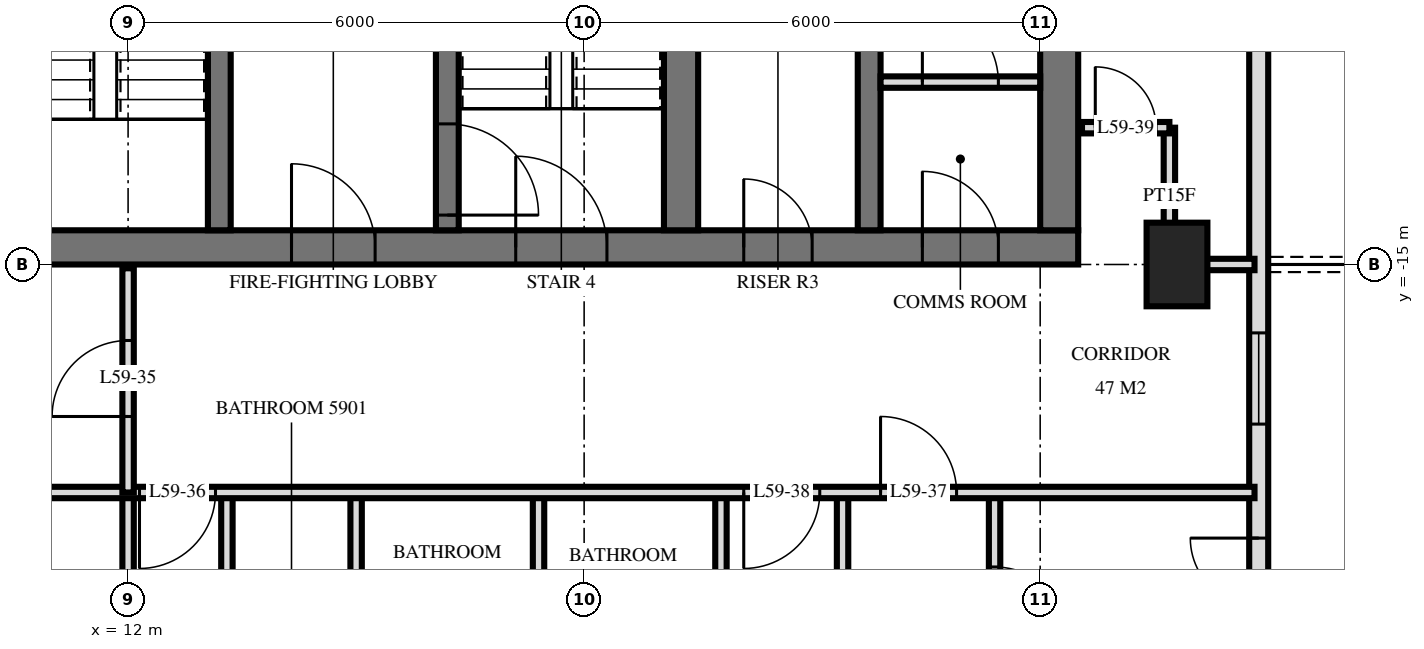
"""IFC4 building model, lengths in metres.
Left out: names, types, materials, properties, quantities, classifications, styles, units other than length and angle.
Written with IfcOpenShell. Run it as: python <this file> out.ifc"""

import sys

from ifc_helpers import new_model, si_unit, direction, frame, frame_2d, origin, origin_2d, place, context, subcontext, project, spatial, rectangle, extrude, element, fill, save


model = new_model("IFC4")
c1 = context("Model", 3, precision=1e-05, world=origin(), true_north=direction((0.0, 1.0)))
c2 = subcontext(c1, "Body", "Model", "MODEL_VIEW")
j1 = project(units=[si_unit("LENGTHUNIT", "METRE"), si_unit("PLANEANGLEUNIT", "RADIAN")], contexts=[c1])
p1 = place(None, origin())
s1 = spatial("IfcSite", under=j1, at=p1, CompositionType="ELEMENT")
p2 = place(p1, origin())
s2 = spatial("IfcBuilding", under=s1, at=p2, CompositionType="ELEMENT")
p3 = place(p2, frame((0.0, 0.0, 225.6)))
s3 = spatial("IfcBuildingStorey", under=s2, at=p3, CompositionType="ELEMENT", Elevation=225.6)
p4 = place(p3, frame((25.8, -15.0, 0.0), z_axis=(0.0, 0.0, 1.0), x_axis=(0.0, 1.0, 0.0)))
e1 = element("IfcColumn", 1, at=p4, inside=s3, PredefinedType="COLUMN", context=c2, shape_type="SweptSolid", body=[
    extrude(rectangle(XDim=1.1, YDim=0.8, at=origin_2d()), origin(), (0.0, 0.0, 1.0), 3.5),
])
p5 = place(p3, frame((10.0, -14.775, 0.0), z_axis=(0.0, 0.0, 1.0), x_axis=(1.0, 0.0, 0.0)))
e2 = element("IfcWall", 2, at=p5, inside=s3, PredefinedType="SHEAR", context=c2, shape_type="SweptSolid", body=[
    extrude(rectangle(XDim=14.5, YDim=0.45, at=frame_2d((7.25, 0.0))), origin(), (0.0, 0.0, 1.0), 3.5),
])
p6 = place(p5, frame((7.1, 0.0, 0.0)))
e3 = element("IfcOpeningElement", 3, at=p6, cuts=e2, PredefinedType="OPENING", context=c2, shape_type="SweptSolid", body=[
    extrude(rectangle(XDim=1.2, YDim=2.1, at=frame_2d((0.6, 1.05))), frame((0.0, 0.235, 0.0), z_axis=(0.0, -1.0, 0.0), x_axis=(1.0, 0.0, 0.0)), (0.0, 0.0, 1.0), 0.47),
])
p7 = place(p5, frame((4.15, 0.0, 0.0)))
e4 = element("IfcOpeningElement", 4, at=p7, cuts=e2, PredefinedType="OPENING", context=c2, shape_type="SweptSolid", body=[
    extrude(rectangle(XDim=1.1, YDim=2.1, at=frame_2d((0.55, 1.05))), frame((0.0, 0.235, 0.0), z_axis=(0.0, -1.0, 0.0), x_axis=(1.0, 0.0, 0.0)), (0.0, 0.0, 1.0), 0.47),
])
p8 = place(p5, frame((10.1, 0.0, 0.0)))
e5 = element("IfcOpeningElement", 5, at=p8, cuts=e2, PredefinedType="OPENING", context=c2, shape_type="SweptSolid", body=[
    extrude(rectangle(XDim=0.9, YDim=2.1, at=frame_2d((0.45, 1.05))), frame((0.0, 0.235, 0.0), z_axis=(0.0, -1.0, 0.0), x_axis=(1.0, 0.0, 0.0)), (0.0, 0.0, 1.0), 0.47),
])
p9 = place(p5, frame((12.45, 0.0, 0.0)))
e6 = element("IfcOpeningElement", 6, at=p9, cuts=e2, PredefinedType="OPENING", context=c2, shape_type="SweptSolid", body=[
    extrude(rectangle(XDim=1.0, YDim=2.1, at=frame_2d((0.5, 1.05))), frame((0.0, 0.235, 0.0), z_axis=(0.0, -1.0, 0.0), x_axis=(1.0, 0.0, 0.0)), (0.0, 0.0, 1.0), 0.47),
])
p10 = place(p3, frame((24.25, -14.55, 0.0), z_axis=(0.0, 0.0, 1.0), x_axis=(0.0, 1.0, 0.0)))
e7 = element("IfcWall", 7, at=p10, inside=s3, PredefinedType="SHEAR", context=c2, shape_type="SweptSolid", body=[
    extrude(rectangle(XDim=14.1, YDim=0.5, at=frame_2d((7.05, 0.0))), origin(), (0.0, 0.0, 1.0), 3.5),
])
p11 = place(p3, frame((13.2, -14.55, 0.0), z_axis=(0.0, 0.0, 1.0), x_axis=(0.0, 1.0, 0.0)))
e8 = element("IfcWall", 8, at=p11, inside=s3, PredefinedType="SHEAR", context=c2, shape_type="SweptSolid", body=[
    extrude(rectangle(XDim=5.4, YDim=0.3, at=frame_2d((2.7, 0.0))), origin(), (0.0, 0.0, 1.0), 3.5),
])
p12 = place(p11, frame((4.0, 0.0, 0.0)))
e9 = element("IfcOpeningElement", 9, at=p12, cuts=e8, PredefinedType="OPENING", context=c2, shape_type="SweptSolid", body=[
    extrude(rectangle(XDim=1.2, YDim=2.1, at=frame_2d((0.6, 1.05))), frame((0.0, 0.16, 0.0), z_axis=(0.0, -1.0, 0.0), x_axis=(1.0, 0.0, 0.0)), (0.0, 0.0, 1.0), 0.32),
])
p13 = place(p3, frame((16.2, -14.55, 0.0), z_axis=(0.0, 0.0, 1.0), x_axis=(0.0, 1.0, 0.0)))
e10 = element("IfcWall", 10, at=p13, inside=s3, PredefinedType="SHEAR", context=c2, shape_type="SweptSolid", body=[
    extrude(rectangle(XDim=5.4, YDim=0.3, at=frame_2d((2.7, 0.0))), origin(), (0.0, 0.0, 1.0), 3.5),
])
p14 = place(p13, frame((0.2, 0.0, 0.0)))
e11 = element("IfcOpeningElement", 11, at=p14, cuts=e10, PredefinedType="OPENING", context=c2, shape_type="SweptSolid", body=[
    extrude(rectangle(XDim=1.2, YDim=2.1, at=frame_2d((0.6, 1.05))), frame((0.0, 0.16, 0.0), z_axis=(0.0, -1.0, 0.0), x_axis=(1.0, 0.0, 0.0)), (0.0, 0.0, 1.0), 0.32),
])
p15 = place(p3, frame((19.275, -14.55, 0.0), z_axis=(0.0, 0.0, 1.0), x_axis=(0.0, 1.0, 0.0)))
e12 = element("IfcWall", 12, at=p15, inside=s3, PredefinedType="SHEAR", context=c2, shape_type="SweptSolid", body=[
    extrude(rectangle(XDim=5.4, YDim=0.45, at=frame_2d((2.7, 0.0))), origin(), (0.0, 0.0, 1.0), 3.5),
])
p16 = place(p3, frame((21.75, -14.55, 0.0), z_axis=(0.0, 0.0, 1.0), x_axis=(0.0, 1.0, 0.0)))
e13 = element("IfcWall", 13, at=p16, inside=s3, PredefinedType="SHEAR", context=c2, shape_type="SweptSolid", body=[
    extrude(rectangle(XDim=5.4, YDim=0.3, at=frame_2d((2.7, 0.0))), origin(), (0.0, 0.0, 1.0), 3.5),
])
p17 = place(p3, frame((26.875, -24.875, 0.0), z_axis=(0.0, 0.0, 1.0), x_axis=(0.0, 1.0, 0.0)))
e14 = element("IfcWall", 14, at=p17, inside=s3, PredefinedType="SOLIDWALL", context=c2, shape_type="SweptSolid", body=[
    extrude(rectangle(XDim=21.551, YDim=0.25, at=frame_2d((10.775, 0.0))), origin(), (0.0, 0.0, 1.0), 3.22),
])
p18 = place(p17, frame((0.575, 0.0, 0.0)))
e15 = element("IfcOpeningElement", 15, at=p18, cuts=e14, PredefinedType="OPENING", context=c2, shape_type="SweptSolid", body=[
    extrude(rectangle(XDim=1.8, YDim=2.4, at=frame_2d((0.9, 1.2))), frame((0.0, 0.135, 0.0), z_axis=(0.0, -1.0, 0.0), x_axis=(1.0, 0.0, 0.0)), (0.0, 0.0, 1.0), 0.27),
])
p19 = place(p17, frame((4.475, 0.0, 0.0)))
e16 = element("IfcOpeningElement", 16, at=p19, cuts=e14, PredefinedType="OPENING", context=c2, shape_type="SweptSolid", body=[
    extrude(rectangle(XDim=1.8, YDim=2.4, at=frame_2d((0.9, 1.2))), frame((0.0, 0.135, 0.0), z_axis=(0.0, -1.0, 0.0), x_axis=(1.0, 0.0, 0.0)), (0.0, 0.0, 1.0), 0.27),
])
p20 = place(p17, frame((7.775, 0.0, 0.9)))
e17 = element("IfcOpeningElement", 17, at=p20, cuts=e14, PredefinedType="OPENING", context=c2, shape_type="SweptSolid", body=[
    extrude(rectangle(XDim=1.2, YDim=1.5, at=frame_2d((0.6, 0.75))), frame((0.0, 0.135, 0.0), z_axis=(0.0, -1.0, 0.0), x_axis=(1.0, 0.0, 0.0)), (0.0, 0.0, 1.0), 0.27),
])
p21 = place(p17, frame((13.1, 0.0, 0.0)))
e18 = element("IfcOpeningElement", 18, at=p21, cuts=e14, PredefinedType="OPENING", context=c2, shape_type="SweptSolid", body=[
    extrude(rectangle(XDim=1.8, YDim=2.4, at=frame_2d((0.9, 1.2))), frame((0.0, 0.135, 0.0), z_axis=(0.0, -1.0, 0.0), x_axis=(1.0, 0.0, 0.0)), (0.0, 0.0, 1.0), 0.27),
])
p22 = place(p3, frame((21.9, -12.6, 0.0), z_axis=(0.0, 0.0, 1.0), x_axis=(1.0, 0.0, 0.0)))
e19 = element("IfcWall", 19, at=p22, inside=s3, PredefinedType="PARTITIONING", context=c2, shape_type="SweptSolid", body=[
    extrude(rectangle(XDim=2.1, YDim=0.15, at=frame_2d((1.05, 0.0))), origin(), (0.0, 0.0, 1.0), 3.2),
])
p23 = place(p22, frame((0.55, 0.0, 0.0)))
e20 = element("IfcOpeningElement", 20, at=p23, cuts=e19, PredefinedType="OPENING", context=c2, shape_type="SweptSolid", body=[
    extrude(rectangle(XDim=1.0, YDim=2.1, at=frame_2d((0.5, 1.05))), frame((0.0, 0.085, 0.0), z_axis=(0.0, -1.0, 0.0), x_axis=(1.0, 0.0, 0.0)), (0.0, 0.0, 1.0), 0.17),
])
p24 = place(p3, frame((25.7, -15.0, 0.0), z_axis=(0.0, 0.0, 1.0), x_axis=(0.0, 1.0, 0.0)))
e21 = element("IfcWall", 21, at=p24, inside=s3, PredefinedType="PARTITIONING", context=c2, shape_type="SweptSolid", body=[
    extrude(rectangle(XDim=1.8, YDim=0.15, at=frame_2d((0.9, 0.0))), origin(), (0.0, 0.0, 1.0), 3.22),
])
p25 = place(p3, frame((23.4, -21.0, 0.0), z_axis=(0.0, 0.0, 1.0), x_axis=(0.0, 1.0, 0.0)))
e22 = element("IfcWall", 22, at=p25, inside=s3, PredefinedType="PARTITIONING", context=c2, shape_type="SweptSolid", body=[
    extrude(rectangle(XDim=3.0, YDim=0.15, at=frame_2d((1.5, 0.0))), origin(), (0.0, 0.0, 1.0), 3.22),
])
p26 = place(p25, frame((1.02, 0.0, 0.0)))
e23 = element("IfcOpeningElement", 23, at=p26, cuts=e22, PredefinedType="OPENING", context=c2, shape_type="SweptSolid", body=[
    extrude(rectangle(XDim=1.0, YDim=2.1, at=frame_2d((0.5, 1.05))), frame((0.0, 0.085, 0.0), z_axis=(0.0, -1.0, 0.0), x_axis=(1.0, 0.0, 0.0)), (0.0, 0.0, 1.0), 0.17),
])
for number, where, z_axis, x_axis in (
    (24, (21.4, -21.0, 0.0), (0.0, 0.0, 1.0), (0.0, 1.0, 0.0)),
    (25, (19.8, -21.0, 0.0), (0.0, 0.0, 1.0), (0.0, 1.0, 0.0)),
    (26, (17.4, -21.0, 0.0), (0.0, 0.0, 1.0), (0.0, 1.0, 0.0)),
):
    element("IfcWall", number, at=place(p3, frame(where, z_axis=z_axis, x_axis=x_axis)), inside=s3, PredefinedType="PARTITIONING", context=c2, shape_type="SweptSolid", body=[
        extrude(rectangle(XDim=3.0, YDim=0.15, at=frame_2d((1.5, 0.0))), origin(), (0.0, 0.0, 1.0), 3.22),
    ])
p27 = place(p3, frame((15.0, -29.22, 0.0), z_axis=(0.0, 0.0, 1.0), x_axis=(0.0, 1.0, 0.0)))
e27 = element("IfcWall", 27, at=p27, inside=s3, PredefinedType="PARTITIONING", context=c2, shape_type="SweptSolid", body=[
    extrude(rectangle(XDim=11.22, YDim=0.15, at=frame_2d((5.61, 0.0))), origin(), (0.0, 0.0, 1.0), 3.22),
])
p28 = place(p3, frame((13.3, -21.0, 0.0), z_axis=(0.0, 0.0, 1.0), x_axis=(0.0, 1.0, 0.0)))
e28 = element("IfcWall", 28, at=p28, inside=s3, PredefinedType="PARTITIONING", context=c2, shape_type="SweptSolid", body=[
    extrude(rectangle(XDim=3.0, YDim=0.15, at=frame_2d((1.5, 0.0))), origin(), (0.0, 0.0, 1.0), 3.22),
])
p29 = place(p28, frame((1.12, 0.0, 0.0)))
e29 = element("IfcOpeningElement", 29, at=p29, cuts=e28, PredefinedType="OPENING", context=c2, shape_type="SweptSolid", body=[
    extrude(rectangle(XDim=0.8, YDim=2.1, at=frame_2d((0.4, 1.05))), frame((0.0, 0.085, 0.0), z_axis=(0.0, -1.0, 0.0), x_axis=(1.0, 0.0, 0.0)), (0.0, 0.0, 1.0), 0.17),
])
p30 = place(p3, frame((12.0, -18.0, 0.0), z_axis=(0.0, 0.0, 1.0), x_axis=(0.0, 1.0, 0.0)))
e30 = element("IfcWall", 30, at=p30, inside=s3, PredefinedType="PARTITIONING", context=c2, shape_type="SweptSolid", body=[
    extrude(rectangle(XDim=2.95, YDim=0.15, at=frame_2d((1.475, 0.0))), origin(), (0.0, 0.0, 1.0), 3.22),
])
p31 = place(p30, frame((1.0, 0.0, 0.0)))
e31 = element("IfcOpeningElement", 31, at=p31, cuts=e30, PredefinedType="OPENING", context=c2, shape_type="SweptSolid", body=[
    extrude(rectangle(XDim=1.0, YDim=2.1, at=frame_2d((0.5, 1.05))), frame((0.0, 0.085, 0.0), z_axis=(0.0, -1.0, 0.0), x_axis=(1.0, 0.0, 0.0)), (0.0, 0.0, 1.0), 0.17),
])
p32 = place(p3, frame((12.0, -29.22, 0.0), z_axis=(0.0, 0.0, 1.0), x_axis=(0.0, 1.0, 0.0)))
e32 = element("IfcWall", 32, at=p32, inside=s3, PredefinedType="PARTITIONING", context=c2, shape_type="SweptSolid", body=[
    extrude(rectangle(XDim=11.22, YDim=0.15, at=frame_2d((5.61, 0.0))), origin(), (0.0, 0.0, 1.0), 3.22),
])
p33 = place(p3, frame((-26.82, -18.0, 0.0), z_axis=(0.0, 0.0, 1.0), x_axis=(1.0, 0.0, 0.0)))
e33 = element("IfcWall", 33, at=p33, inside=s3, PredefinedType="PARTITIONING", context=c2, shape_type="SweptSolid", body=[
    extrude(rectangle(XDim=53.64, YDim=0.15, at=frame_2d((26.82, 0.0))), origin(), (0.0, 0.0, 1.0), 3.22),
])
p34 = place(p33, frame((4.92, 0.0, 0.0)))
e34 = element("IfcOpeningElement", 34, at=p34, cuts=e33, PredefinedType="OPENING", context=c2, shape_type="SweptSolid", body=[
    extrude(rectangle(XDim=1.0, YDim=2.1, at=frame_2d((0.5, 1.05))), frame((0.0, 0.085, 0.0), z_axis=(0.0, -1.0, 0.0), x_axis=(1.0, 0.0, 0.0)), (0.0, 0.0, 1.0), 0.17),
])
p35 = place(p33, frame((1.62, 0.0, 0.0)))
e35 = element("IfcOpeningElement", 35, at=p35, cuts=e33, PredefinedType="OPENING", context=c2, shape_type="SweptSolid", body=[
    extrude(rectangle(XDim=1.0, YDim=2.1, at=frame_2d((0.5, 1.05))), frame((0.0, 0.085, 0.0), z_axis=(0.0, -1.0, 0.0), x_axis=(1.0, 0.0, 0.0)), (0.0, 0.0, 1.0), 0.17),
])
p36 = place(p33, frame((38.97, 0.0, 0.0)))
e36 = element("IfcOpeningElement", 36, at=p36, cuts=e33, PredefinedType="OPENING", context=c2, shape_type="SweptSolid", body=[
    extrude(rectangle(XDim=1.0, YDim=2.1, at=frame_2d((0.5, 1.05))), frame((0.0, 0.085, 0.0), z_axis=(0.0, -1.0, 0.0), x_axis=(1.0, 0.0, 0.0)), (0.0, 0.0, 1.0), 0.17),
])
p37 = place(p33, frame((48.72, 0.0, 0.0)))
e37 = element("IfcOpeningElement", 37, at=p37, cuts=e33, PredefinedType="OPENING", context=c2, shape_type="SweptSolid", body=[
    extrude(rectangle(XDim=1.0, YDim=2.1, at=frame_2d((0.5, 1.05))), frame((0.0, 0.085, 0.0), z_axis=(0.0, -1.0, 0.0), x_axis=(1.0, 0.0, 0.0)), (0.0, 0.0, 1.0), 0.17),
])
p38 = place(p33, frame((46.92, 0.0, 0.0)))
e38 = element("IfcOpeningElement", 38, at=p38, cuts=e33, PredefinedType="OPENING", context=c2, shape_type="SweptSolid", body=[
    extrude(rectangle(XDim=1.0, YDim=2.1, at=frame_2d((0.5, 1.05))), frame((0.0, 0.085, 0.0), z_axis=(0.0, -1.0, 0.0), x_axis=(1.0, 0.0, 0.0)), (0.0, 0.0, 1.0), 0.17),
])
p39 = place(p33, frame((18.82, 0.0, 0.0)))
e39 = element("IfcOpeningElement", 39, at=p39, cuts=e33, PredefinedType="OPENING", context=c2, shape_type="SweptSolid", body=[
    extrude(rectangle(XDim=1.0, YDim=2.1, at=frame_2d((0.5, 1.05))), frame((0.0, 0.085, 0.0), z_axis=(0.0, -1.0, 0.0), x_axis=(1.0, 0.0, 0.0)), (0.0, 0.0, 1.0), 0.17),
])
p40 = place(p33, frame((27.82, 0.0, 0.0)))
e40 = element("IfcOpeningElement", 40, at=p40, cuts=e33, PredefinedType="OPENING", context=c2, shape_type="SweptSolid", body=[
    extrude(rectangle(XDim=1.0, YDim=2.1, at=frame_2d((0.5, 1.05))), frame((0.0, 0.085, 0.0), z_axis=(0.0, -1.0, 0.0), x_axis=(1.0, 0.0, 0.0)), (0.0, 0.0, 1.0), 0.17),
])
p41 = place(p33, frame((35.32, 0.0, 0.0)))
e41 = element("IfcOpeningElement", 41, at=p41, cuts=e33, PredefinedType="OPENING", context=c2, shape_type="SweptSolid", body=[
    extrude(rectangle(XDim=1.0, YDim=2.1, at=frame_2d((0.5, 1.05))), frame((0.0, 0.085, 0.0), z_axis=(0.0, -1.0, 0.0), x_axis=(1.0, 0.0, 0.0)), (0.0, 0.0, 1.0), 0.17),
])
p42 = place(p3, frame((25.7, -15.0, 0.0), z_axis=(0.0, 0.0, 1.0), x_axis=(1.0, 0.0, 0.0)))
e42 = element("IfcWall", 42, at=p42, inside=s3, PredefinedType="PARTITIONING", context=c2, shape_type="SweptSolid", body=[
    extrude(rectangle(XDim=1.12, YDim=0.15, at=frame_2d((0.56, 0.0))), origin(), (0.0, 0.0, 1.0), 3.22),
])
p43 = place(p3, frame((24.55, -13.2, 0.0), z_axis=(0.0, 0.0, 1.0), x_axis=(1.0, 0.0, 0.0)))
e43 = element("IfcWall", 43, at=p43, inside=s3, PredefinedType="PARTITIONING", context=c2, shape_type="SweptSolid", body=[
    extrude(rectangle(XDim=1.15, YDim=0.15, at=frame_2d((0.575, 0.0))), origin(), (0.0, 0.0, 1.0), 3.22),
])
p44 = place(p43, frame((0.175, 0.0, 0.0)))
e44 = element("IfcOpeningElement", 44, at=p44, cuts=e43, PredefinedType="OPENING", context=c2, shape_type="SweptSolid", body=[
    extrude(rectangle(XDim=0.8, YDim=2.1, at=frame_2d((0.4, 1.05))), frame((0.0, 0.085, 0.0), z_axis=(0.0, -1.0, 0.0), x_axis=(1.0, 0.0, 0.0)), (0.0, 0.0, 1.0), 0.17),
])
p45 = place(p19, origin())
e45 = element("IfcDoor", 45, at=p45, inside=s3, OperationType="DOUBLE_DOOR_SINGLE_SWING", PredefinedType="DOOR", context=c2, shape_type="SweptSolid", body=[
    extrude(rectangle(XDim=1.8, YDim=2.4, at=frame_2d((0.9, 1.2))), frame((0.0, 0.025, 0.0), z_axis=(0.0, -1.0, 0.0), x_axis=(1.0, 0.0, 0.0)), (0.0, 0.0, 1.0), 0.05),
])
fill(e16, e45)
p46 = place(p20, origin())
e46 = element("IfcWindow", 46, at=p46, inside=s3, PartitioningType="SINGLE_PANEL", PredefinedType="WINDOW", context=c2, shape_type="SweptSolid", body=[
    extrude(rectangle(XDim=1.2, YDim=1.5, at=frame_2d((0.6, 0.75))), frame((0.0, 0.03, 0.0), z_axis=(0.0, -1.0, 0.0), x_axis=(1.0, 0.0, 0.0)), (0.0, 0.0, 1.0), 0.06),
])
fill(e17, e46)
p47 = place(p6, origin())
e47 = element("IfcDoor", 47, at=p47, inside=s3, OperationType="SINGLE_SWING_RIGHT", PredefinedType="DOOR", context=c2, shape_type="SweptSolid", body=[
    extrude(rectangle(XDim=1.2, YDim=2.1, at=frame_2d((0.6, 1.05))), frame((0.0, 0.025, 0.0), z_axis=(0.0, -1.0, 0.0), x_axis=(1.0, 0.0, 0.0)), (0.0, 0.0, 1.0), 0.05),
])
fill(e3, e47)
p48 = place(p7, origin())
e48 = element("IfcDoor", 48, at=p48, inside=s3, OperationType="SINGLE_SWING_RIGHT", PredefinedType="DOOR", context=c2, shape_type="SweptSolid", body=[
    extrude(rectangle(XDim=1.1, YDim=2.1, at=frame_2d((0.55, 1.05))), frame((0.0, 0.025, 0.0), z_axis=(0.0, -1.0, 0.0), x_axis=(1.0, 0.0, 0.0)), (0.0, 0.0, 1.0), 0.05),
])
fill(e4, e48)
p49 = place(p8, origin())
e49 = element("IfcDoor", 49, at=p49, inside=s3, OperationType="SINGLE_SWING_RIGHT", PredefinedType="DOOR", context=c2, shape_type="SweptSolid", body=[
    extrude(rectangle(XDim=0.9, YDim=2.1, at=frame_2d((0.45, 1.05))), frame((0.0, 0.025, 0.0), z_axis=(0.0, -1.0, 0.0), x_axis=(1.0, 0.0, 0.0)), (0.0, 0.0, 1.0), 0.05),
])
fill(e5, e49)
p50 = place(p9, origin())
e50 = element("IfcDoor", 50, at=p50, inside=s3, OperationType="SINGLE_SWING_RIGHT", PredefinedType="DOOR", context=c2, shape_type="SweptSolid", body=[
    extrude(rectangle(XDim=1.0, YDim=2.1, at=frame_2d((0.5, 1.05))), frame((0.0, 0.025, 0.0), z_axis=(0.0, -1.0, 0.0), x_axis=(1.0, 0.0, 0.0)), (0.0, 0.0, 1.0), 0.05),
])
fill(e6, e50)
p51 = place(p14, frame((0.6, 0.0, 0.0), z_axis=(0.0, 0.0, 1.0), x_axis=(-1.0, 0.0, 0.0)))
e51 = element("IfcDoor", 51, at=p51, inside=s3, OperationType="SINGLE_SWING_LEFT", PredefinedType="DOOR", context=c2, shape_type="SweptSolid", body=[
    extrude(rectangle(XDim=1.2, YDim=2.1, at=frame_2d((0.0, 1.05))), frame((0.0, -0.025, 0.0), z_axis=(0.0, 1.0, 0.0), x_axis=(-1.0, 0.0, 0.0)), (0.0, 0.0, 1.0), 0.05),
])
fill(e11, e51)
p52 = place(p23, origin())
e52 = element("IfcDoor", 52, at=p52, inside=s3, OperationType="SINGLE_SWING_RIGHT", PredefinedType="DOOR", context=c2, shape_type="SweptSolid", body=[
    extrude(rectangle(XDim=1.0, YDim=2.1, at=frame_2d((0.5, 1.05))), frame((0.0, 0.025, 0.0), z_axis=(0.0, -1.0, 0.0), x_axis=(1.0, 0.0, 0.0)), (0.0, 0.0, 1.0), 0.05),
])
fill(e20, e52)
p53 = place(p31, origin())
e53 = element("IfcDoor", 53, at=p53, inside=s3, OperationType="SINGLE_SWING_RIGHT", PredefinedType="DOOR", context=c2, shape_type="SweptSolid", body=[
    extrude(rectangle(XDim=1.0, YDim=2.1, at=frame_2d((0.5, 1.05))), frame((0.0, 0.025, 0.0), z_axis=(0.0, -1.0, 0.0), x_axis=(1.0, 0.0, 0.0)), (0.0, 0.0, 1.0), 0.05),
])
fill(e31, e53)
p54 = place(p36, frame((0.5, 0.0, 0.0), z_axis=(0.0, 0.0, 1.0), x_axis=(-1.0, 0.0, 0.0)))
e54 = element("IfcDoor", 54, at=p54, inside=s3, OperationType="SINGLE_SWING_LEFT", PredefinedType="DOOR", context=c2, shape_type="SweptSolid", body=[
    extrude(rectangle(XDim=1.0, YDim=2.1, at=frame_2d((0.0, 1.05))), frame((0.0, -0.025, 0.0), z_axis=(0.0, 1.0, 0.0), x_axis=(-1.0, 0.0, 0.0)), (0.0, 0.0, 1.0), 0.05),
])
fill(e36, e54)
p55 = place(p37, origin())
e55 = element("IfcDoor", 55, at=p55, inside=s3, OperationType="SINGLE_SWING_RIGHT", PredefinedType="DOOR", context=c2, shape_type="SweptSolid", body=[
    extrude(rectangle(XDim=1.0, YDim=2.1, at=frame_2d((0.5, 1.05))), frame((0.0, 0.025, 0.0), z_axis=(0.0, -1.0, 0.0), x_axis=(1.0, 0.0, 0.0)), (0.0, 0.0, 1.0), 0.05),
])
fill(e37, e55)
p56 = place(p38, frame((0.5, 0.0, 0.0), z_axis=(0.0, 0.0, 1.0), x_axis=(-1.0, 0.0, 0.0)))
e56 = element("IfcDoor", 56, at=p56, inside=s3, OperationType="SINGLE_SWING_LEFT", PredefinedType="DOOR", context=c2, shape_type="SweptSolid", body=[
    extrude(rectangle(XDim=1.0, YDim=2.1, at=frame_2d((0.0, 1.05))), frame((0.0, -0.025, 0.0), z_axis=(0.0, 1.0, 0.0), x_axis=(-1.0, 0.0, 0.0)), (0.0, 0.0, 1.0), 0.05),
])
fill(e38, e56)
p57 = place(p44, origin())
e57 = element("IfcDoor", 57, at=p57, inside=s3, OperationType="SINGLE_SWING_RIGHT", PredefinedType="DOOR", context=c2, shape_type="SweptSolid", body=[
    extrude(rectangle(XDim=0.8, YDim=2.1, at=frame_2d((0.4, 1.05))), frame((0.0, 0.025, 0.0), z_axis=(0.0, -1.0, 0.0), x_axis=(1.0, 0.0, 0.0)), (0.0, 0.0, 1.0), 0.05),
])
fill(e44, e57)
p58 = place(p26, frame((0.5, 0.0, 0.0), z_axis=(0.0, 0.0, 1.0), x_axis=(-1.0, 0.0, 0.0)))
e58 = element("IfcDoor", 58, at=p58, inside=s3, OperationType="SINGLE_SWING_LEFT", PredefinedType="DOOR", context=c2, shape_type="SweptSolid", body=[
    extrude(rectangle(XDim=1.0, YDim=2.1, at=frame_2d((0.0, 1.05))), frame((0.0, -0.025, 0.0), z_axis=(0.0, 1.0, 0.0), x_axis=(-1.0, 0.0, 0.0)), (0.0, 0.0, 1.0), 0.05),
])
fill(e23, e58)
save(model, sys.argv[1])
